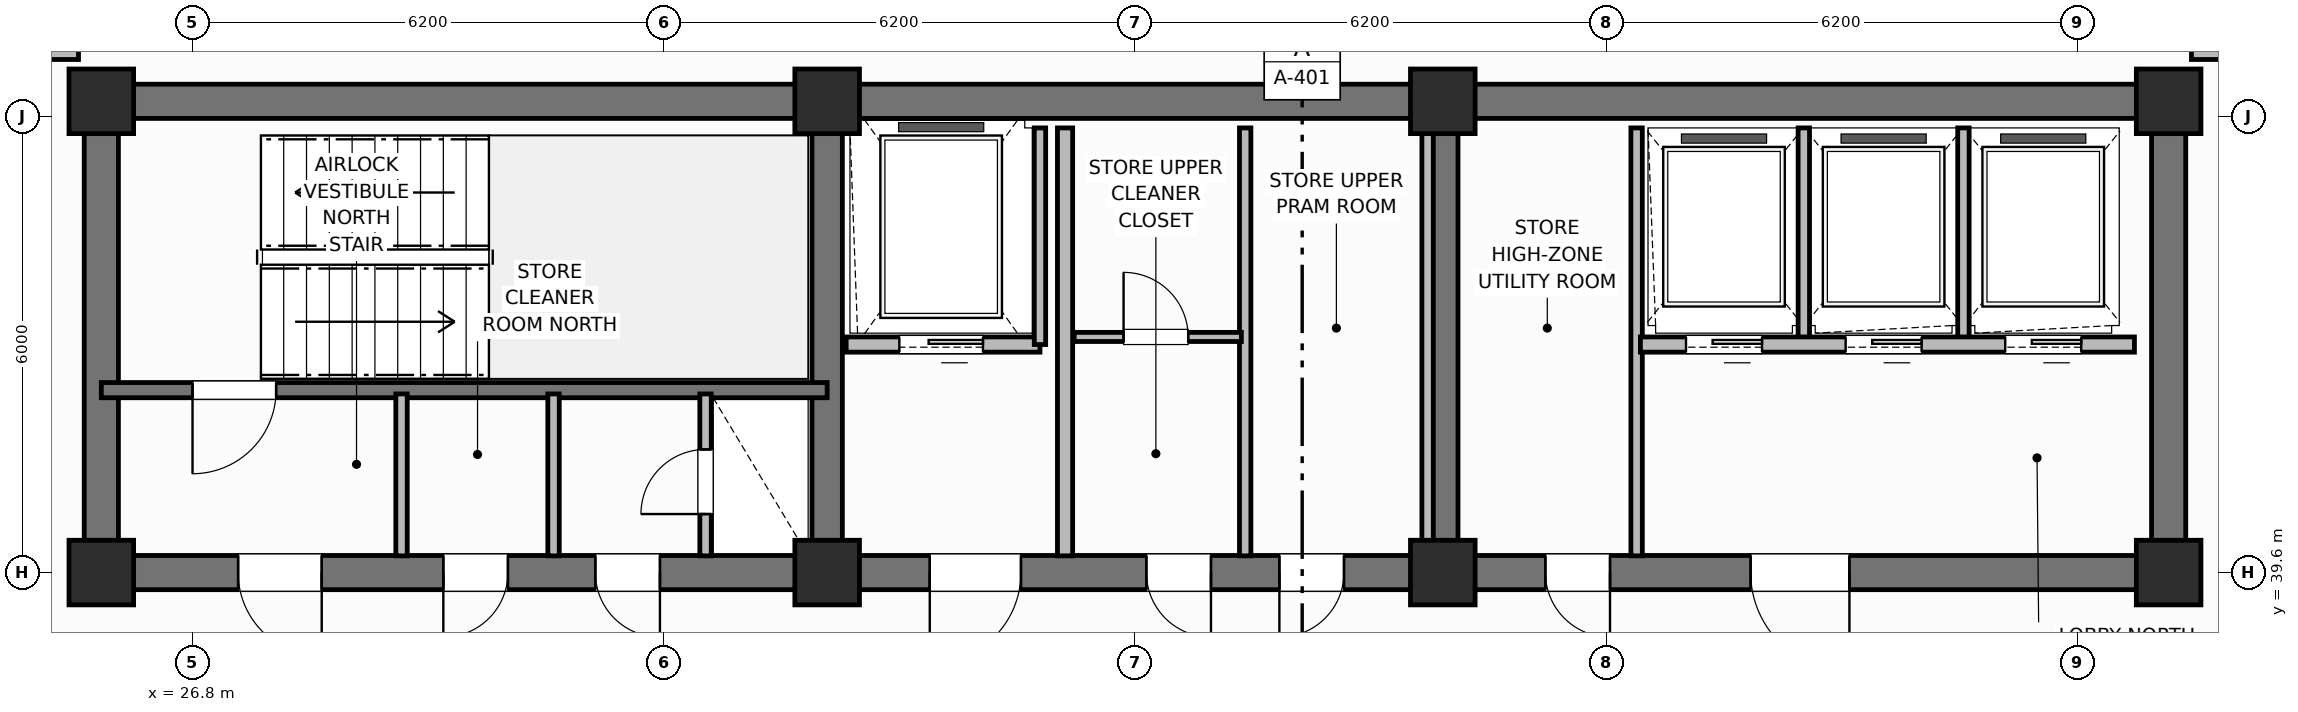
"""IFC4 building model, lengths in metres.
Left out: names, types, materials, properties, quantities, classifications, styles, units other than length and angle.
Written with IfcOpenShell. Run it as: python <this file> out.ifc"""

import sys

from ifc_helpers import new_model, si_unit, direction, frame, frame_2d, origin, origin_2d, place, context, subcontext, project, spatial, rectangle, extrude, element, fill, save


model = new_model("IFC4")
c1 = context("Model", 3, precision=1e-05, world=origin(), true_north=direction((0.0, 1.0)))
c2 = subcontext(c1, "Body", "Model", "MODEL_VIEW")
j1 = project(units=[si_unit("LENGTHUNIT", "METRE"), si_unit("PLANEANGLEUNIT", "RADIAN")], contexts=[c1])
p1 = place(None, origin())
s1 = spatial("IfcSite", under=j1, at=p1, CompositionType="ELEMENT")
p2 = place(p1, origin())
s2 = spatial("IfcBuilding", under=s1, at=p2, CompositionType="ELEMENT")
p3 = place(p2, frame((0.0, 0.0, 244.3)))
s3 = spatial("IfcBuildingStorey", under=s2, at=p3, CompositionType="ELEMENT", Elevation=244.3)
p4 = place(p3, frame((25.6, 45.8, 0.0), z_axis=(0.0, 0.0, 1.0), x_axis=(1.0, 0.0, 0.0)))
e1 = element("IfcWall", 1, at=p4, inside=s3, PredefinedType="SHEAR", context=c2, shape_type="SweptSolid", body=[
    extrude(rectangle(XDim=27.2, YDim=0.45, at=frame_2d((13.6, 0.0))), origin(), (0.0, 0.0, 1.0), 3.7),
])
for number, where, z_axis, x_axis in (
    (2, (25.6, 39.825, 0.0), (0.0, 0.0, 1.0), (0.0, 1.0, 0.0)),
    (3, (52.8, 39.825, 0.0), (0.0, 0.0, 1.0), (0.0, 1.0, 0.0)),
):
    element("IfcWall", number, at=place(p3, frame(where, z_axis=z_axis, x_axis=x_axis)), inside=s3, PredefinedType="SHEAR", context=c2, shape_type="SweptSolid", body=[
        extrude(rectangle(XDim=5.75, YDim=0.45, at=frame_2d((2.875, 0.0))), origin(), (0.0, 0.0, 1.0), 3.7),
    ])
p5 = place(p3, frame((52.8, 39.6, 0.0), z_axis=(0.0, 0.0, 1.0), x_axis=(-1.0, 0.0, 0.0)))
e4 = element("IfcWall", 4, at=p5, inside=s3, PredefinedType="SHEAR", context=c2, shape_type="SweptSolid", body=[
    extrude(rectangle(XDim=27.2, YDim=0.45, at=frame_2d((13.6, 0.0))), origin(), (0.0, 0.0, 1.0), 3.7),
])
p6 = place(p5, frame((24.3, 0.0, 0.0)))
e5 = element("IfcOpeningElement", 5, at=p6, cuts=e4, PredefinedType="OPENING", context=c2, shape_type="SweptSolid", body=[
    extrude(rectangle(XDim=1.1, YDim=2.15, at=frame_2d((0.55, 1.075))), frame((0.0, 0.235, 0.0), z_axis=(0.0, -1.0, 0.0), x_axis=(1.0, 0.0, 0.0)), (0.0, 0.0, 1.0), 0.47),
])
p7 = place(p5, frame((21.85, 0.0, 0.0)))
e6 = element("IfcOpeningElement", 6, at=p7, cuts=e4, PredefinedType="OPENING", context=c2, shape_type="SweptSolid", body=[
    extrude(rectangle(XDim=0.85, YDim=2.1, at=frame_2d((0.425, 1.05))), frame((0.0, 0.235, 0.0), z_axis=(0.0, -1.0, 0.0), x_axis=(1.0, 0.0, 0.0)), (0.0, 0.0, 1.0), 0.47),
])
p8 = place(p5, frame((19.85, 0.0, 0.0)))
e7 = element("IfcOpeningElement", 7, at=p8, cuts=e4, PredefinedType="OPENING", context=c2, shape_type="SweptSolid", body=[
    extrude(rectangle(XDim=0.85, YDim=2.1, at=frame_2d((0.425, 1.05))), frame((0.0, 0.235, 0.0), z_axis=(0.0, -1.0, 0.0), x_axis=(1.0, 0.0, 0.0)), (0.0, 0.0, 1.0), 0.47),
])
p9 = place(p5, frame((15.1, 0.0, 0.0)))
e8 = element("IfcOpeningElement", 8, at=p9, cuts=e4, PredefinedType="OPENING", context=c2, shape_type="SweptSolid", body=[
    extrude(rectangle(XDim=1.2, YDim=2.15, at=frame_2d((0.6, 1.075))), frame((0.0, 0.235, 0.0), z_axis=(0.0, -1.0, 0.0), x_axis=(1.0, 0.0, 0.0)), (0.0, 0.0, 1.0), 0.47),
])
p10 = place(p5, frame((12.6, 0.0, 0.0)))
e9 = element("IfcOpeningElement", 9, at=p10, cuts=e4, PredefinedType="OPENING", context=c2, shape_type="SweptSolid", body=[
    extrude(rectangle(XDim=0.85, YDim=2.1, at=frame_2d((0.425, 1.05))), frame((0.0, 0.235, 0.0), z_axis=(0.0, -1.0, 0.0), x_axis=(1.0, 0.0, 0.0)), (0.0, 0.0, 1.0), 0.47),
])
p11 = place(p5, frame((10.85, 0.0, 0.0)))
e10 = element("IfcOpeningElement", 10, at=p11, cuts=e4, PredefinedType="OPENING", context=c2, shape_type="SweptSolid", body=[
    extrude(rectangle(XDim=0.85, YDim=2.1, at=frame_2d((0.425, 1.05))), frame((0.0, 0.235, 0.0), z_axis=(0.0, -1.0, 0.0), x_axis=(1.0, 0.0, 0.0)), (0.0, 0.0, 1.0), 0.47),
])
p12 = place(p5, frame((7.35, 0.0, 0.0)))
e11 = element("IfcOpeningElement", 11, at=p12, cuts=e4, PredefinedType="OPENING", context=c2, shape_type="SweptSolid", body=[
    extrude(rectangle(XDim=0.85, YDim=2.1, at=frame_2d((0.425, 1.05))), frame((0.0, 0.235, 0.0), z_axis=(0.0, -1.0, 0.0), x_axis=(1.0, 0.0, 0.0)), (0.0, 0.0, 1.0), 0.47),
])
p13 = place(p5, frame((4.2, 0.0, 0.0)))
e12 = element("IfcOpeningElement", 12, at=p13, cuts=e4, PredefinedType="OPENING", context=c2, shape_type="SweptSolid", body=[
    extrude(rectangle(XDim=1.3, YDim=2.2, at=frame_2d((0.65, 1.1))), frame((0.0, 0.235, 0.0), z_axis=(0.0, -1.0, 0.0), x_axis=(1.0, 0.0, 0.0)), (0.0, 0.0, 1.0), 0.47),
])
for number, where, z_axis, x_axis in (
    (13, (35.15, 39.825, 0.0), (0.0, 0.0, 1.0), (0.0, 1.0, 0.0)),
    (14, (43.25, 39.825, 0.0), (0.0, 0.0, 1.0), (0.0, 1.0, 0.0)),
):
    element("IfcWall", number, at=place(p3, frame(where, z_axis=z_axis, x_axis=x_axis)), inside=s3, PredefinedType="SHEAR", context=c2, shape_type="SweptSolid", body=[
        extrude(rectangle(XDim=5.75, YDim=0.4, at=frame_2d((2.875, 0.0))), origin(), (0.0, 0.0, 1.0), 3.7),
    ])
for number, where, z_axis, x_axis in (
    (15, (25.6, 39.6, 0.0), (0.0, 0.0, 1.0), (1.0, 0.0, 0.0)),
    (16, (25.6, 45.8, 0.0), (0.0, 0.0, 1.0), (1.0, 0.0, 0.0)),
    (17, (35.15, 39.6, 0.0), (0.0, 0.0, 1.0), (1.0, 0.0, 0.0)),
    (18, (35.15, 45.8, 0.0), (0.0, 0.0, 1.0), (1.0, 0.0, 0.0)),
    (19, (43.25, 39.6, 0.0), (0.0, 0.0, 1.0), (1.0, 0.0, 0.0)),
    (20, (43.25, 45.8, 0.0), (0.0, 0.0, 1.0), (1.0, 0.0, 0.0)),
    (21, (52.8, 39.6, 0.0), (0.0, 0.0, 1.0), (1.0, 0.0, 0.0)),
    (22, (52.8, 45.8, 0.0), (0.0, 0.0, 1.0), (1.0, 0.0, 0.0)),
):
    element("IfcColumn", number, at=place(p3, frame(where, z_axis=z_axis, x_axis=x_axis)), inside=s3, PredefinedType="COLUMN", context=c2, shape_type="SweptSolid", body=[
        extrude(rectangle(XDim=0.85, YDim=0.85, at=origin_2d()), origin(), (0.0, 0.0, 1.0), 3.7),
    ])
p14 = place(p3, frame((35.15, 42.0, 0.0), z_axis=(0.0, 0.0, 1.0), x_axis=(-1.0, 0.0, 0.0)))
e23 = element("IfcWall", 23, at=p14, inside=s3, PredefinedType="SHEAR", context=c2, shape_type="SweptSolid", body=[
    extrude(rectangle(XDim=9.55, YDim=0.2, at=frame_2d((4.775, 0.0))), origin(), (0.0, 0.0, 1.0), 3.7),
])
p15 = place(p14, frame((7.25, 0.0, 0.0)))
e24 = element("IfcOpeningElement", 24, at=p15, cuts=e23, PredefinedType="OPENING", context=c2, shape_type="SweptSolid", body=[
    extrude(rectangle(XDim=1.1, YDim=2.15, at=frame_2d((0.55, 1.075))), frame((0.0, 0.11, 0.0), z_axis=(0.0, -1.0, 0.0), x_axis=(1.0, 0.0, 0.0)), (0.0, 0.0, 1.0), 0.22),
])
p16 = place(p3, frame((33.55, 39.82, 0.0), z_axis=(0.0, 0.0, 1.0), x_axis=(0.0, 1.0, 0.0)))
e25 = element("IfcWall", 25, at=p16, inside=s3, PredefinedType="PARTITIONING", context=c2, shape_type="SweptSolid", body=[
    extrude(rectangle(XDim=2.13, YDim=0.15, at=frame_2d((1.065, 0.0))), origin(), (0.0, 0.0, 1.0), 2.56),
])
p17 = place(p16, frame((0.55, 0.0, 0.0)))
e26 = element("IfcOpeningElement", 26, at=p17, cuts=e25, PredefinedType="OPENING", context=c2, shape_type="SweptSolid", body=[
    extrude(rectangle(XDim=0.85, YDim=2.05, at=frame_2d((0.425, 1.025))), frame((0.0, 0.085, 0.0), z_axis=(0.0, -1.0, 0.0), x_axis=(1.0, 0.0, 0.0)), (0.0, 0.0, 1.0), 0.17),
])
for number, where, z_axis, x_axis in (
    (27, (29.55, 39.82, 0.0), (0.0, 0.0, 1.0), (0.0, 1.0, 0.0)),
    (28, (31.55, 39.82, 0.0), (0.0, 0.0, 1.0), (0.0, 1.0, 0.0)),
):
    element("IfcWall", number, at=place(p3, frame(where, z_axis=z_axis, x_axis=x_axis)), inside=s3, PredefinedType="PARTITIONING", context=c2, shape_type="SweptSolid", body=[
        extrude(rectangle(XDim=2.13, YDim=0.15, at=frame_2d((1.065, 0.0))), origin(), (0.0, 0.0, 1.0), 2.56),
    ])
p18 = place(p3, frame((37.95, 42.6, 0.0), z_axis=(0.0, 0.0, 1.0), x_axis=(-1.0, 0.0, 0.0)))
e29 = element("IfcWall", 29, at=p18, inside=s3, PredefinedType="PARTITIONING", context=c2, shape_type="SweptSolid", body=[
    extrude(rectangle(XDim=2.55, YDim=0.2, at=frame_2d((1.275, 0.0))), origin(), (0.0, 0.0, 1.0), 2.33),
])
p19 = place(p18, frame((0.75, 0.0, 0.0)))
e30 = element("IfcOpeningElement", 30, at=p19, cuts=e29, PredefinedType="OPENING", context=c2, shape_type="SweptSolid", body=[
    extrude(rectangle(XDim=1.1, YDim=2.15, at=frame_2d((0.55, 1.075))), frame((0.0, 0.11, 0.0), z_axis=(0.0, -1.0, 0.0), x_axis=(1.0, 0.0, 0.0)), (0.0, 0.0, 1.0), 0.22),
])
p20 = place(p3, frame((37.95, 42.6, 0.0), z_axis=(0.0, 0.0, 1.0), x_axis=(0.0, 1.0, 0.0)))
e31 = element("IfcWall", 31, at=p20, inside=s3, PredefinedType="PARTITIONING", context=c2, shape_type="SweptSolid", body=[
    extrude(rectangle(XDim=2.85, YDim=0.15, at=frame_2d((1.425, 0.0))), origin(), (0.0, 0.0, 1.0), 2.56),
])
p21 = place(p3, frame((38.28, 39.82, 0.0), z_axis=(0.0, 0.0, 1.0), x_axis=(0.0, 1.0, 0.0)))
e32 = element("IfcWall", 32, at=p21, inside=s3, PredefinedType="PARTITIONING", context=c2, shape_type="SweptSolid", body=[
    extrude(rectangle(XDim=5.63, YDim=0.2, at=frame_2d((2.815, 0.0))), origin(), (0.0, 0.0, 1.0), 2.56),
])
for number, where, z_axis, x_axis in (
    (33, (43.05, 39.82, 0.0), (0.0, 0.0, 1.0), (0.0, 1.0, 0.0)),
    (34, (40.65, 39.82, 0.0), (0.0, 0.0, 1.0), (0.0, 1.0, 0.0)),
):
    element("IfcWall", number, at=place(p3, frame(where, z_axis=z_axis, x_axis=x_axis)), inside=s3, PredefinedType="PARTITIONING", context=c2, shape_type="SweptSolid", body=[
        extrude(rectangle(XDim=5.63, YDim=0.15, at=frame_2d((2.815, 0.0))), origin(), (0.0, 0.0, 1.0), 2.56),
    ])
p22 = place(p3, frame((38.4, 42.7, 0.0), z_axis=(0.0, 0.0, 1.0), x_axis=(1.0, 0.0, 0.0)))
e35 = element("IfcWall", 35, at=p22, inside=s3, PredefinedType="PARTITIONING", context=c2, shape_type="SweptSolid", body=[
    extrude(rectangle(XDim=2.2, YDim=0.12, at=frame_2d((1.1, 0.0))), origin(), (0.0, 0.0, 1.0), 2.33),
])
p23 = place(p22, frame((0.65, 0.0, 0.0)))
e36 = element("IfcOpeningElement", 36, at=p23, cuts=e35, PredefinedType="OPENING", context=c2, shape_type="SweptSolid", body=[
    extrude(rectangle(XDim=0.85, YDim=2.1, at=frame_2d((0.425, 1.05))), frame((0.0, 0.07, 0.0), z_axis=(0.0, -1.0, 0.0), x_axis=(1.0, 0.0, 0.0)), (0.0, 0.0, 1.0), 0.14),
])
p24 = place(p3, frame((45.8, 39.82, 0.0), z_axis=(0.0, 0.0, 1.0), x_axis=(0.0, 1.0, 0.0)))
e37 = element("IfcWall", 37, at=p24, inside=s3, PredefinedType="PARTITIONING", context=c2, shape_type="SweptSolid", body=[
    extrude(rectangle(XDim=5.63, YDim=0.15, at=frame_2d((2.815, 0.0))), origin(), (0.0, 0.0, 1.0), 2.56),
])
for number, where, z_axis, x_axis in (
    (38, (48.0, 42.65, 0.0), (0.0, 0.0, 1.0), (0.0, 1.0, 0.0)),
    (39, (50.1, 42.65, 0.0), (0.0, 0.0, 1.0), (0.0, 1.0, 0.0)),
):
    element("IfcWall", number, at=place(p3, frame(where, z_axis=z_axis, x_axis=x_axis)), inside=s3, PredefinedType="PARTITIONING", context=c2, shape_type="SweptSolid", body=[
        extrude(rectangle(XDim=2.8, YDim=0.15, at=frame_2d((1.4, 0.0))), origin(), (0.0, 0.0, 1.0), 2.56),
    ])
p25 = place(p3, frame((52.35, 42.6, 0.0), z_axis=(0.0, 0.0, 1.0), x_axis=(-1.0, 0.0, 0.0)))
e40 = element("IfcWall", 40, at=p25, inside=s3, PredefinedType="PARTITIONING", context=c2, shape_type="SweptSolid", body=[
    extrude(rectangle(XDim=6.5, YDim=0.2, at=frame_2d((3.25, 0.0))), origin(), (0.0, 0.0, 1.0), 2.56),
])
p26 = place(p25, frame((4.9, 0.0, 0.0)))
e41 = element("IfcOpeningElement", 41, at=p26, cuts=e40, PredefinedType="OPENING", context=c2, shape_type="SweptSolid", body=[
    extrude(rectangle(XDim=1.0, YDim=2.15, at=frame_2d((0.5, 1.075))), frame((0.0, 0.11, 0.0), z_axis=(0.0, -1.0, 0.0), x_axis=(1.0, 0.0, 0.0)), (0.0, 0.0, 1.0), 0.22),
])
p27 = place(p25, frame((2.8, 0.0, 0.0)))
e42 = element("IfcOpeningElement", 42, at=p27, cuts=e40, PredefinedType="OPENING", context=c2, shape_type="SweptSolid", body=[
    extrude(rectangle(XDim=1.0, YDim=2.15, at=frame_2d((0.5, 1.075))), frame((0.0, 0.11, 0.0), z_axis=(0.0, -1.0, 0.0), x_axis=(1.0, 0.0, 0.0)), (0.0, 0.0, 1.0), 0.22),
])
p28 = place(p25, frame((0.7, 0.0, 0.0)))
e43 = element("IfcOpeningElement", 43, at=p28, cuts=e40, PredefinedType="OPENING", context=c2, shape_type="SweptSolid", body=[
    extrude(rectangle(XDim=1.0, YDim=2.15, at=frame_2d((0.5, 1.075))), frame((0.0, 0.11, 0.0), z_axis=(0.0, -1.0, 0.0), x_axis=(1.0, 0.0, 0.0)), (0.0, 0.0, 1.0), 0.22),
])
p29 = place(p3, frame((21.546, 46.45, 0.0), z_axis=(0.0, 0.0, 1.0), x_axis=(1.0, 0.0, 0.0)))
e44 = element("IfcWall", 44, at=p29, inside=s3, PredefinedType="PARTITIONING", context=c2, shape_type="SweptSolid", body=[
    extrude(rectangle(XDim=3.754, YDim=0.2, at=frame_2d((1.877, 0.0))), origin(), (0.0, 0.0, 1.0), 2.56),
])
p30 = place(p3, frame((53.1, 46.45, 0.0), z_axis=(0.0, 0.0, 1.0), x_axis=(1.0, 0.0, 0.0)))
e45 = element("IfcWall", 45, at=p30, inside=s3, PredefinedType="PARTITIONING", context=c2, shape_type="SweptSolid", body=[
    extrude(rectangle(XDim=3.754, YDim=0.2, at=frame_2d((1.877, 0.0))), origin(), (0.0, 0.0, 1.0), 2.56),
])
p31 = place(p15, origin())
e46 = element("IfcDoor", 46, at=p31, inside=s3, OperationType="SINGLE_SWING_RIGHT", PredefinedType="DOOR", context=c2, shape_type="SweptSolid", body=[
    extrude(rectangle(XDim=1.1, YDim=2.15, at=frame_2d((0.55, 1.075))), frame((0.0, 0.025, 0.0), z_axis=(0.0, -1.0, 0.0), x_axis=(1.0, 0.0, 0.0)), (0.0, 0.0, 1.0), 0.05),
])
fill(e24, e46)
p32 = place(p17, origin())
e47 = element("IfcDoor", 47, at=p32, inside=s3, OperationType="SINGLE_SWING_LEFT", PredefinedType="TRAPDOOR", context=c2, shape_type="SweptSolid", body=[
    extrude(rectangle(XDim=0.85, YDim=2.05, at=frame_2d((0.425, 1.025))), frame((0.0, 0.025, 0.0), z_axis=(0.0, -1.0, 0.0), x_axis=(1.0, 0.0, 0.0)), (0.0, 0.0, 1.0), 0.05),
])
fill(e26, e47)
p33 = place(p19, origin())
e48 = element("IfcDoor", 48, at=p33, inside=s3, OperationType="SLIDING_TO_LEFT", PredefinedType="DOOR", context=c2, shape_type="SweptSolid", body=[
    extrude(rectangle(XDim=1.1, YDim=2.15, at=frame_2d((0.55, 1.075))), frame((0.0, 0.025, 0.0), z_axis=(0.0, -1.0, 0.0), x_axis=(1.0, 0.0, 0.0)), (0.0, 0.0, 1.0), 0.05),
])
fill(e30, e48)
p34 = place(p23, origin())
e49 = element("IfcDoor", 49, at=p34, inside=s3, OperationType="SINGLE_SWING_LEFT", PredefinedType="DOOR", context=c2, shape_type="SweptSolid", body=[
    extrude(rectangle(XDim=0.85, YDim=2.1, at=frame_2d((0.425, 1.05))), frame((0.0, 0.025, 0.0), z_axis=(0.0, -1.0, 0.0), x_axis=(1.0, 0.0, 0.0)), (0.0, 0.0, 1.0), 0.05),
])
fill(e36, e49)
p35 = place(p26, origin())
e50 = element("IfcDoor", 50, at=p35, inside=s3, OperationType="SLIDING_TO_LEFT", PredefinedType="DOOR", context=c2, shape_type="SweptSolid", body=[
    extrude(rectangle(XDim=1.0, YDim=2.15, at=frame_2d((0.5, 1.075))), frame((0.0, 0.025, 0.0), z_axis=(0.0, -1.0, 0.0), x_axis=(1.0, 0.0, 0.0)), (0.0, 0.0, 1.0), 0.05),
])
fill(e41, e50)
p36 = place(p27, origin())
e51 = element("IfcDoor", 51, at=p36, inside=s3, OperationType="SLIDING_TO_LEFT", PredefinedType="DOOR", context=c2, shape_type="SweptSolid", body=[
    extrude(rectangle(XDim=1.0, YDim=2.15, at=frame_2d((0.5, 1.075))), frame((0.0, 0.025, 0.0), z_axis=(0.0, -1.0, 0.0), x_axis=(1.0, 0.0, 0.0)), (0.0, 0.0, 1.0), 0.05),
])
fill(e42, e51)
p37 = place(p28, origin())
e52 = element("IfcDoor", 52, at=p37, inside=s3, OperationType="SLIDING_TO_LEFT", PredefinedType="DOOR", context=c2, shape_type="SweptSolid", body=[
    extrude(rectangle(XDim=1.0, YDim=2.15, at=frame_2d((0.5, 1.075))), frame((0.0, 0.025, 0.0), z_axis=(0.0, -1.0, 0.0), x_axis=(1.0, 0.0, 0.0)), (0.0, 0.0, 1.0), 0.05),
])
fill(e43, e52)
p38 = place(p6, origin())
e53 = element("IfcDoor", 53, at=p38, inside=s3, OperationType="SINGLE_SWING_LEFT", PredefinedType="DOOR", context=c2, shape_type="SweptSolid", body=[
    extrude(rectangle(XDim=1.1, YDim=2.15, at=frame_2d((0.55, 1.075))), frame((0.0, 0.025, 0.0), z_axis=(0.0, -1.0, 0.0), x_axis=(1.0, 0.0, 0.0)), (0.0, 0.0, 1.0), 0.05),
])
fill(e5, e53)
p39 = place(p7, origin())
e54 = element("IfcDoor", 54, at=p39, inside=s3, OperationType="SINGLE_SWING_RIGHT", PredefinedType="DOOR", context=c2, shape_type="SweptSolid", body=[
    extrude(rectangle(XDim=0.85, YDim=2.1, at=frame_2d((0.425, 1.05))), frame((0.0, 0.025, 0.0), z_axis=(0.0, -1.0, 0.0), x_axis=(1.0, 0.0, 0.0)), (0.0, 0.0, 1.0), 0.05),
])
fill(e6, e54)
p40 = place(p8, origin())
e55 = element("IfcDoor", 55, at=p40, inside=s3, OperationType="SINGLE_SWING_LEFT", PredefinedType="DOOR", context=c2, shape_type="SweptSolid", body=[
    extrude(rectangle(XDim=0.85, YDim=2.1, at=frame_2d((0.425, 1.05))), frame((0.0, 0.025, 0.0), z_axis=(0.0, -1.0, 0.0), x_axis=(1.0, 0.0, 0.0)), (0.0, 0.0, 1.0), 0.05),
])
fill(e7, e55)
p41 = place(p9, origin())
e56 = element("IfcDoor", 56, at=p41, inside=s3, OperationType="SINGLE_SWING_RIGHT", PredefinedType="DOOR", context=c2, shape_type="SweptSolid", body=[
    extrude(rectangle(XDim=1.2, YDim=2.15, at=frame_2d((0.6, 1.075))), frame((0.0, 0.025, 0.0), z_axis=(0.0, -1.0, 0.0), x_axis=(1.0, 0.0, 0.0)), (0.0, 0.0, 1.0), 0.05),
])
fill(e8, e56)
p42 = place(p10, origin())
e57 = element("IfcDoor", 57, at=p42, inside=s3, OperationType="SINGLE_SWING_LEFT", PredefinedType="DOOR", context=c2, shape_type="SweptSolid", body=[
    extrude(rectangle(XDim=0.85, YDim=2.1, at=frame_2d((0.425, 1.05))), frame((0.0, 0.025, 0.0), z_axis=(0.0, -1.0, 0.0), x_axis=(1.0, 0.0, 0.0)), (0.0, 0.0, 1.0), 0.05),
])
fill(e9, e57)
p43 = place(p11, origin())
e58 = element("IfcDoor", 58, at=p43, inside=s3, OperationType="SINGLE_SWING_RIGHT", PredefinedType="DOOR", context=c2, shape_type="SweptSolid", body=[
    extrude(rectangle(XDim=0.85, YDim=2.1, at=frame_2d((0.425, 1.05))), frame((0.0, 0.025, 0.0), z_axis=(0.0, -1.0, 0.0), x_axis=(1.0, 0.0, 0.0)), (0.0, 0.0, 1.0), 0.05),
])
fill(e10, e58)
p44 = place(p12, origin())
e59 = element("IfcDoor", 59, at=p44, inside=s3, OperationType="SINGLE_SWING_LEFT", PredefinedType="DOOR", context=c2, shape_type="SweptSolid", body=[
    extrude(rectangle(XDim=0.85, YDim=2.1, at=frame_2d((0.425, 1.05))), frame((0.0, 0.025, 0.0), z_axis=(0.0, -1.0, 0.0), x_axis=(1.0, 0.0, 0.0)), (0.0, 0.0, 1.0), 0.05),
])
fill(e11, e59)
p45 = place(p13, origin())
e60 = element("IfcDoor", 60, at=p45, inside=s3, OperationType="SINGLE_SWING_LEFT", PredefinedType="DOOR", context=c2, shape_type="SweptSolid", body=[
    extrude(rectangle(XDim=1.3, YDim=2.2, at=frame_2d((0.65, 1.1))), frame((0.0, 0.025, 0.0), z_axis=(0.0, -1.0, 0.0), x_axis=(1.0, 0.0, 0.0)), (0.0, 0.0, 1.0), 0.05),
])
fill(e12, e60)
save(model, sys.argv[1])
